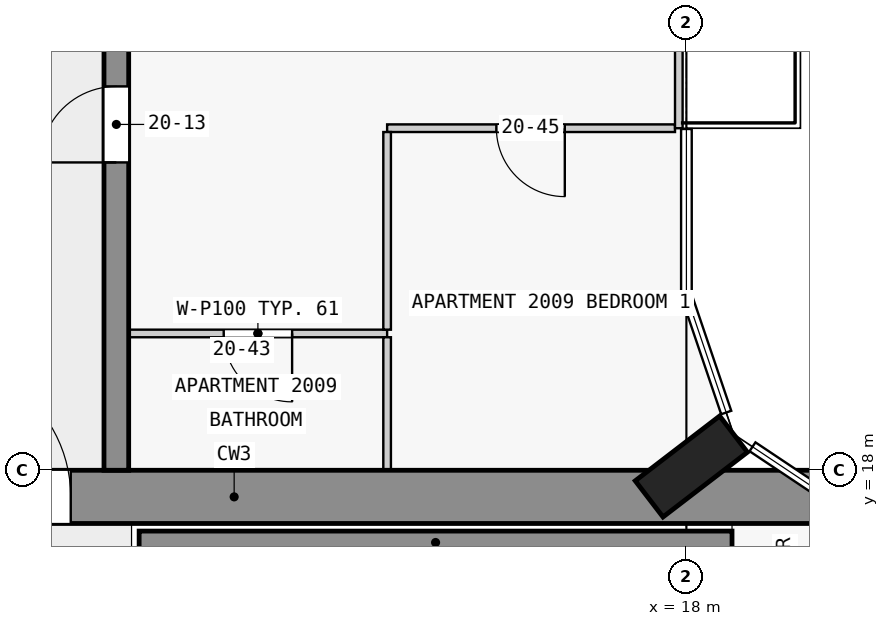
"""IFC4 building model, lengths in metres.
Left out: names, types, materials, properties, quantities, classifications, styles, units other than length and angle.
Written with IfcOpenShell. Run it as: python <this file> out.ifc"""

import sys

from ifc_helpers import new_model, si_unit, direction, frame, frame_2d, origin, origin_2d, place, context, subcontext, project, spatial, rectangle, extrude, element, fill, save


model = new_model("IFC4")
c1 = context("Model", 3, precision=1e-05, world=origin(), true_north=direction((0.0, 1.0)))
c2 = subcontext(c1, "Body", "Model", "MODEL_VIEW")
j1 = project(units=[si_unit("LENGTHUNIT", "METRE"), si_unit("PLANEANGLEUNIT", "RADIAN")], contexts=[c1])
p1 = place(None, origin())
s1 = spatial("IfcSite", under=j1, at=p1, CompositionType="ELEMENT")
p2 = place(p1, origin())
s2 = spatial("IfcBuilding", under=s1, at=p2, CompositionType="ELEMENT")
p3 = place(p2, frame((0.0, 0.0, 81.8)))
s3 = spatial("IfcBuildingStorey", under=s2, at=p3, CompositionType="ELEMENT", Elevation=81.8)
p4 = place(p3, frame((18.065, 18.05, 0.0), z_axis=(0.0, 0.0, 1.0), x_axis=(-0.608810846443, 0.793315418515, 0.0)))
e1 = element("IfcColumn", 1, at=p4, inside=s3, PredefinedType="COLUMN", context=c2, shape_type="SweptSolid", body=[
    extrude(rectangle(XDim=0.6, YDim=1.4, at=origin_2d()), origin(), (0.0, 0.0, 1.0), 3.5),
])
p5 = place(p3, frame((1.6, 17.65, 0.0), z_axis=(0.0, 0.0, 1.0), x_axis=(1.0, 0.0, 0.0)))
e2 = element("IfcWall", 2, at=p5, inside=s3, PredefinedType="SHEAR", context=c2, shape_type="SweptSolid", body=[
    extrude(rectangle(XDim=20.9, YDim=0.7, at=frame_2d((10.45, 0.0))), origin(), (0.0, 0.0, 1.0), 3.25),
])
p6 = place(p5, frame((6.5, 0.0, 0.0)))
e3 = element("IfcOpeningElement", 3, at=p6, cuts=e2, PredefinedType="OPENING", context=c2, shape_type="SweptSolid", body=[
    extrude(rectangle(XDim=1.8, YDim=2.1, at=frame_2d((0.9, 1.05))), frame((0.0, 0.36, 0.0), z_axis=(0.0, -1.0, 0.0), x_axis=(1.0, 0.0, 0.0)), (0.0, 0.0, 1.0), 0.72),
])
p7 = place(p3, frame((10.8, 17.05, 0.0), z_axis=(0.0, 0.0, 1.0), x_axis=(1.0, 0.0, 0.0)))
e4 = element("IfcWall", 4, at=p7, inside=s3, PredefinedType="SHEAR", context=c2, shape_type="SweptSolid", body=[
    extrude(rectangle(XDim=7.8, YDim=0.3, at=frame_2d((3.9, 0.0))), origin(), (0.0, 0.0, 1.0), 3.25),
])
p8 = place(p3, frame((10.5, 18.0, 0.0), z_axis=(0.0, 0.0, 1.0), x_axis=(0.0, 1.0, 0.0)))
e5 = element("IfcWall", 5, at=p8, inside=s3, PredefinedType="SHEAR", context=c2, shape_type="SweptSolid", body=[
    extrude(rectangle(XDim=27.0, YDim=0.325, at=frame_2d((13.5, 0.0))), origin(), (0.0, 0.0, 1.0), 3.25),
])
p9 = place(p8, frame((4.05, 0.0, 0.0)))
e6 = element("IfcOpeningElement", 6, at=p9, cuts=e5, PredefinedType="OPENING", context=c2, shape_type="SweptSolid", body=[
    extrude(rectangle(XDim=1.0, YDim=2.1, at=frame_2d((0.5, 1.05))), frame((0.0, 0.172, 0.0), z_axis=(0.0, -1.0, 0.0), x_axis=(1.0, 0.0, 0.0)), (0.0, 0.0, 1.0), 0.345),
])
p10 = place(p8, frame((13.05, 0.0, 0.0)))
e7 = element("IfcOpeningElement", 7, at=p10, cuts=e5, PredefinedType="OPENING", context=c2, shape_type="SweptSolid", body=[
    extrude(rectangle(XDim=1.0, YDim=2.1, at=frame_2d((0.5, 1.05))), frame((0.0, 0.172, 0.0), z_axis=(0.0, -1.0, 0.0), x_axis=(1.0, 0.0, 0.0)), (0.0, 0.0, 1.0), 0.345),
])
p11 = place(p8, frame((19.75, 0.0, 0.0)))
e8 = element("IfcOpeningElement", 8, at=p11, cuts=e5, PredefinedType="OPENING", context=c2, shape_type="SweptSolid", body=[
    extrude(rectangle(XDim=1.0, YDim=2.1, at=frame_2d((0.5, 1.05))), frame((0.0, 0.172, 0.0), z_axis=(0.0, -1.0, 0.0), x_axis=(1.0, 0.0, 0.0)), (0.0, 0.0, 1.0), 0.345),
])
p12 = place(p8, frame((23.25, 0.0, 0.0)))
e9 = element("IfcOpeningElement", 9, at=p12, cuts=e5, PredefinedType="OPENING", context=c2, shape_type="SweptSolid", body=[
    extrude(rectangle(XDim=0.9, YDim=2.1, at=frame_2d((0.45, 1.05))), frame((0.0, 0.172, 0.0), z_axis=(0.0, -1.0, 0.0), x_axis=(1.0, 0.0, 0.0)), (0.0, 0.0, 1.0), 0.345),
])
p13 = place(p8, frame((25.45, 0.0, 0.0)))
e10 = element("IfcOpeningElement", 10, at=p13, cuts=e5, PredefinedType="OPENING", context=c2, shape_type="SweptSolid", body=[
    extrude(rectangle(XDim=1.0, YDim=2.1, at=frame_2d((0.5, 1.05))), frame((0.0, 0.172, 0.0), z_axis=(0.0, -1.0, 0.0), x_axis=(1.0, 0.0, 0.0)), (0.0, 0.0, 1.0), 0.345),
])
p14 = place(p3, frame((17.9, 27.0, 0.0), z_axis=(0.0, 0.0, 1.0), x_axis=(0.0, -1.0, 0.0)))
e11 = element("IfcWall", 11, at=p14, inside=s3, PredefinedType="STANDARD", context=c2, shape_type="SweptSolid", body=[
    extrude(rectangle(XDim=4.5, YDim=0.1, at=frame_2d((2.25, 0.0))), origin(), (0.0, 0.0, 1.0), 3.25),
])
p15 = place(p14, frame((1.05, 0.0, 0.0)))
e12 = element("IfcOpeningElement", 12, at=p15, cuts=e11, PredefinedType="OPENING", context=c2, shape_type="SweptSolid", body=[
    extrude(rectangle(XDim=2.4, YDim=2.4, at=frame_2d((1.2, 1.2))), frame((0.0, 0.06, 0.0), z_axis=(0.0, -1.0, 0.0), x_axis=(1.0, 0.0, 0.0)), (0.0, 0.0, 1.0), 0.12),
])
p16 = place(p3, frame((14.062, 19.8, 0.0), z_axis=(0.0, 0.0, 1.0), x_axis=(-1.0, 0.0, 0.0)))
e13 = element("IfcWall", 13, at=p16, inside=s3, PredefinedType="PARTITIONING", context=c2, shape_type="SweptSolid", body=[
    extrude(rectangle(XDim=3.4, YDim=0.1, at=frame_2d((1.7, 0.0))), origin(), (0.0, 0.0, 1.0), 3.25),
])
p17 = place(p16, frame((1.25, 0.0, 0.0)))
e14 = element("IfcOpeningElement", 14, at=p17, cuts=e13, PredefinedType="OPENING", context=c2, shape_type="SweptSolid", body=[
    extrude(rectangle(XDim=0.9, YDim=2.1, at=frame_2d((0.45, 1.05))), frame((0.0, 0.06, 0.0), z_axis=(0.0, -1.0, 0.0), x_axis=(1.0, 0.0, 0.0)), (0.0, 0.0, 1.0), 0.12),
])
p18 = place(p3, frame((17.85, 22.5, 0.0), z_axis=(0.0, 0.0, 1.0), x_axis=(-1.0, 0.0, 0.0)))
e15 = element("IfcWall", 15, at=p18, inside=s3, PredefinedType="PARTITIONING", context=c2, shape_type="SweptSolid", body=[
    extrude(rectangle(XDim=3.788, YDim=0.1, at=frame_2d((1.894, 0.0))), origin(), (0.0, 0.0, 1.0), 3.25),
])
p19 = place(p18, frame((1.45, 0.0, 0.0)))
e16 = element("IfcOpeningElement", 16, at=p19, cuts=e15, PredefinedType="OPENING", context=c2, shape_type="SweptSolid", body=[
    extrude(rectangle(XDim=0.9, YDim=2.1, at=frame_2d((0.45, 1.05))), frame((0.0, 0.06, 0.0), z_axis=(0.0, -1.0, 0.0), x_axis=(1.0, 0.0, 0.0)), (0.0, 0.0, 1.0), 0.12),
])
p20 = place(p3, frame((14.062, 22.45, 0.0), z_axis=(0.0, 0.0, 1.0), x_axis=(0.0, -1.0, 0.0)))
e17 = element("IfcWall", 17, at=p20, inside=s3, PredefinedType="PARTITIONING", context=c2, shape_type="SweptSolid", body=[
    extrude(rectangle(XDim=2.6, YDim=0.1, at=frame_2d((1.3, 0.0))), origin(), (0.0, 0.0, 1.0), 3.25),
])
p21 = place(p3, frame((14.062, 18.0, 0.0), z_axis=(0.0, 0.0, 1.0), x_axis=(0.0, 1.0, 0.0)))
e18 = element("IfcWall", 18, at=p21, inside=s3, PredefinedType="PARTITIONING", context=c2, shape_type="SweptSolid", body=[
    extrude(rectangle(XDim=1.75, YDim=0.1, at=frame_2d((0.875, 0.0))), origin(), (0.0, 0.0, 1.0), 3.25),
])
p22 = place(p6, origin())
e19 = element("IfcDoor", 19, at=p22, inside=s3, OperationType="DOUBLE_DOOR_SINGLE_SWING", PredefinedType="DOOR", context=c2, shape_type="SweptSolid", body=[
    extrude(rectangle(XDim=1.8, YDim=2.1, at=frame_2d((0.9, 1.05))), frame((0.0, 0.025, 0.0), z_axis=(0.0, -1.0, 0.0), x_axis=(1.0, 0.0, 0.0)), (0.0, 0.0, 1.0), 0.05),
])
fill(e3, e19)
p23 = place(p9, origin())
e20 = element("IfcDoor", 20, at=p23, inside=s3, OperationType="SINGLE_SWING_LEFT", PredefinedType="DOOR", context=c2, shape_type="SweptSolid", body=[
    extrude(rectangle(XDim=1.0, YDim=2.1, at=frame_2d((0.5, 1.05))), frame((0.0, 0.025, 0.0), z_axis=(0.0, -1.0, 0.0), x_axis=(1.0, 0.0, 0.0)), (0.0, 0.0, 1.0), 0.05),
])
fill(e6, e20)
p24 = place(p17, origin())
e21 = element("IfcDoor", 21, at=p24, inside=s3, OperationType="SINGLE_SWING_LEFT", PredefinedType="DOOR", context=c2, shape_type="SweptSolid", body=[
    extrude(rectangle(XDim=0.9, YDim=2.1, at=frame_2d((0.45, 1.05))), frame((0.0, 0.025, 0.0), z_axis=(0.0, -1.0, 0.0), x_axis=(1.0, 0.0, 0.0)), (0.0, 0.0, 1.0), 0.05),
])
fill(e14, e21)
p25 = place(p19, origin())
e22 = element("IfcDoor", 22, at=p25, inside=s3, OperationType="SINGLE_SWING_RIGHT", PredefinedType="DOOR", context=c2, shape_type="SweptSolid", body=[
    extrude(rectangle(XDim=0.9, YDim=2.1, at=frame_2d((0.45, 1.05))), frame((0.0, 0.025, 0.0), z_axis=(0.0, -1.0, 0.0), x_axis=(1.0, 0.0, 0.0)), (0.0, 0.0, 1.0), 0.05),
])
fill(e16, e22)
save(model, sys.argv[1])
